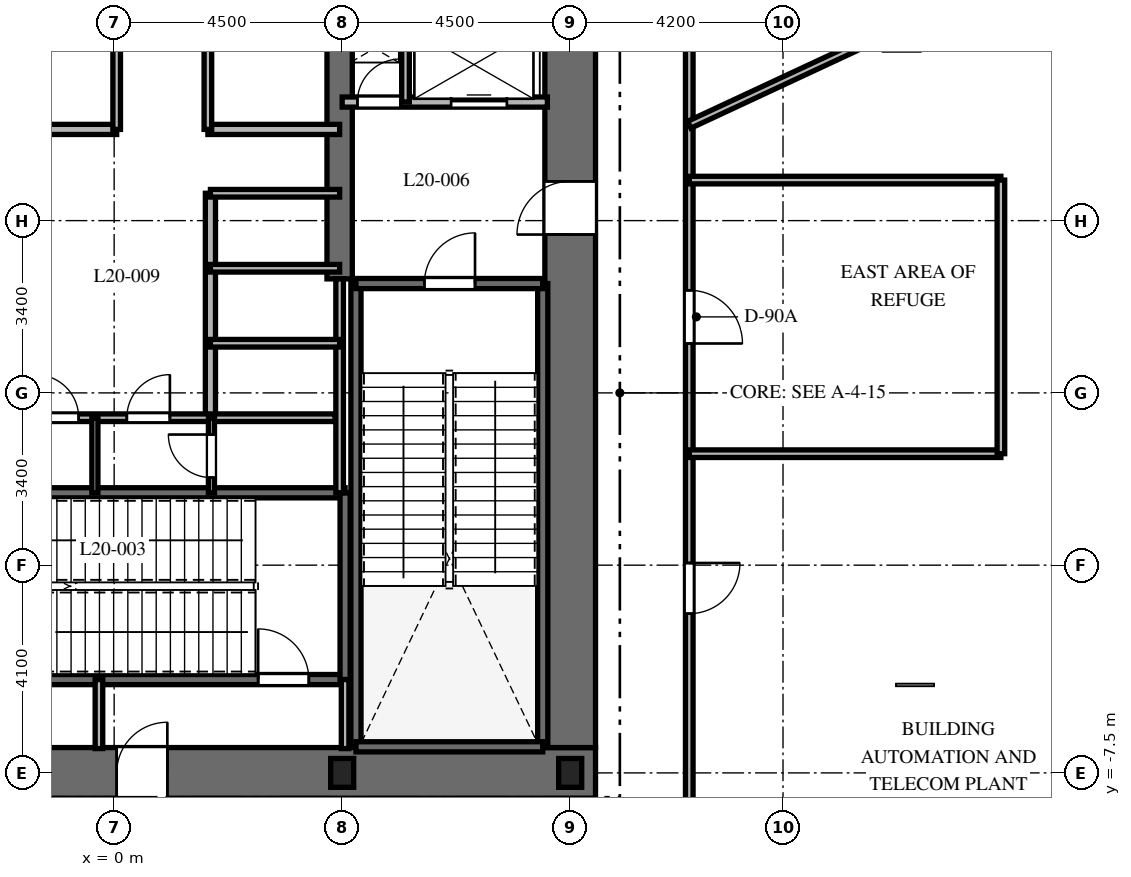
"""IFC4 building model, lengths in metres.
Left out: names, types, materials, properties, quantities, classifications, styles, units other than length and angle.
Written with IfcOpenShell. Run it as: python <this file> out.ifc"""

import sys

from ifc_helpers import new_model, si_unit, direction, frame, frame_2d, origin, origin_2d, place, context, subcontext, project, spatial, rectangle, i_section, extrude, element, fill, save


model = new_model("IFC4")
c1 = context("Model", 3, precision=1e-05, world=origin(), true_north=direction((0.0, 1.0)))
c2 = subcontext(c1, "Body", "Model", "MODEL_VIEW")
j1 = project(units=[si_unit("LENGTHUNIT", "METRE"), si_unit("PLANEANGLEUNIT", "RADIAN")], contexts=[c1])
p1 = place(None, origin())
s1 = spatial("IfcSite", under=j1, at=p1, CompositionType="ELEMENT")
p2 = place(p1, origin())
s2 = spatial("IfcBuilding", under=s1, at=p2, CompositionType="ELEMENT")
p3 = place(p2, frame((0.0, 0.0, 86.0)))
s3 = spatial("IfcBuildingStorey", under=s2, at=p3, CompositionType="ELEMENT", Elevation=86.0)
p4 = place(p3, frame((-9.5, -7.5, 0.0), z_axis=(0.0, 0.0, 1.0), x_axis=(1.0, 0.0, 0.0)))
e1 = element("IfcWall", 1, at=p4, inside=s3, PredefinedType="SHEAR", context=c2, shape_type="SweptSolid", body=[
    extrude(rectangle(XDim=19.0, YDim=1.0, at=frame_2d((9.5, 0.0))), origin(), (0.0, 0.0, 1.0), 5.4),
])
p5 = place(p4, frame((9.55, 0.0, 0.0)))
e2 = element("IfcOpeningElement", 2, at=p5, cuts=e1, PredefinedType="OPENING", context=c2, shape_type="SweptSolid", body=[
    extrude(rectangle(XDim=1.0, YDim=2.15, at=frame_2d((0.5, 1.075))), frame((0.0, 0.51, 0.0), z_axis=(0.0, -1.0, 0.0), x_axis=(1.0, 0.0, 0.0)), (0.0, 0.0, 1.0), 1.02),
])
p6 = place(p3, frame((9.0, -7.0, 0.0), z_axis=(0.0, 0.0, 1.0), x_axis=(0.0, 1.0, 0.0)))
e3 = element("IfcWall", 3, at=p6, inside=s3, PredefinedType="SHEAR", context=c2, shape_type="SweptSolid", body=[
    extrude(rectangle(XDim=14.0, YDim=1.0, at=frame_2d((7.0, 0.0))), origin(), (0.0, 0.0, 1.0), 5.4),
])
p7 = place(p6, frame((10.125, 0.0, 0.0)))
e4 = element("IfcOpeningElement", 4, at=p7, cuts=e3, PredefinedType="OPENING", context=c2, shape_type="SweptSolid", body=[
    extrude(rectangle(XDim=1.05, YDim=2.15, at=frame_2d((0.525, 1.075))), frame((0.0, 0.51, 0.0), z_axis=(0.0, -1.0, 0.0), x_axis=(1.0, 0.0, 0.0)), (0.0, 0.0, 1.0), 1.02),
])
p8 = place(p3, frame((4.45, 2.25, 0.0), z_axis=(0.0, 0.0, 1.0), x_axis=(0.0, 1.0, 0.0)))
e5 = element("IfcWall", 5, at=p8, inside=s3, PredefinedType="SHEAR", context=c2, shape_type="SweptSolid", body=[
    extrude(rectangle(XDim=4.75, YDim=0.5, at=frame_2d((2.375, 0.0))), origin(), (0.0, 0.0, 1.0), 5.4),
])
for number, where, z_axis, x_axis in (
    (6, (4.772, -6.985, 0.0), (0.0, 0.0, 1.0), (0.0, 1.0, 0.0)),
    (7, (8.458, -6.985, 0.0), (0.0, 0.0, 1.0), (0.0, 1.0, 0.0)),
):
    element("IfcWall", number, at=place(p3, frame(where, z_axis=z_axis, x_axis=x_axis)), inside=s3, PredefinedType="SHEAR", context=c2, shape_type="SweptSolid", body=[
        extrude(rectangle(XDim=9.143, YDim=0.2, at=frame_2d((4.572, 0.0))), origin(), (0.0, 0.0, 1.0), 5.4),
    ])
p9 = place(p3, frame((4.772, -6.985, 0.0), z_axis=(0.0, 0.0, 1.0), x_axis=(1.0, 0.0, 0.0)))
e8 = element("IfcWall", 8, at=p9, inside=s3, PredefinedType="SHEAR", context=c2, shape_type="SweptSolid", body=[
    extrude(rectangle(XDim=3.686, YDim=0.2, at=frame_2d((1.843, 0.0))), origin(), (0.0, 0.0, 1.0), 5.4),
])
p10 = place(p3, frame((4.772, 2.158, 0.0), z_axis=(0.0, 0.0, 1.0), x_axis=(1.0, 0.0, 0.0)))
e9 = element("IfcWall", 9, at=p10, inside=s3, PredefinedType="SHEAR", context=c2, shape_type="SweptSolid", body=[
    extrude(rectangle(XDim=3.686, YDim=0.2, at=frame_2d((1.843, 0.0))), origin(), (0.0, 0.0, 1.0), 5.4),
])
p11 = place(p10, frame((1.35, 0.0, 0.0)))
e10 = element("IfcOpeningElement", 10, at=p11, cuts=e9, PredefinedType="OPENING", context=c2, shape_type="SweptSolid", body=[
    extrude(rectangle(XDim=1.0, YDim=2.15, at=frame_2d((0.5, 1.075))), frame((0.0, 0.11, 0.0), z_axis=(0.0, -1.0, 0.0), x_axis=(1.0, 0.0, 0.0)), (0.0, 0.0, 1.0), 0.22),
])
p12 = place(p3, frame((-4.608, -5.658, 0.0), z_axis=(0.0, 0.0, 1.0), x_axis=(1.0, 0.0, 0.0)))
e11 = element("IfcWall", 11, at=p12, inside=s3, PredefinedType="SHEAR", context=c2, shape_type="SweptSolid", body=[
    extrude(rectangle(XDim=9.166, YDim=0.2, at=frame_2d((4.583, 0.0))), origin(), (0.0, 0.0, 1.0), 5.4),
])
p13 = place(p12, frame((7.45, 0.0, 0.0)))
e12 = element("IfcOpeningElement", 12, at=p13, cuts=e11, PredefinedType="OPENING", context=c2, shape_type="SweptSolid", body=[
    extrude(rectangle(XDim=1.0, YDim=2.15, at=frame_2d((0.5, 1.075))), frame((0.0, 0.11, 0.0), z_axis=(0.0, -1.0, 0.0), x_axis=(1.0, 0.0, 0.0)), (0.0, 0.0, 1.0), 0.22),
])
p14 = place(p3, frame((-4.608, -1.972, 0.0), z_axis=(0.0, 0.0, 1.0), x_axis=(1.0, 0.0, 0.0)))
e13 = element("IfcWall", 13, at=p14, inside=s3, PredefinedType="SHEAR", context=c2, shape_type="SweptSolid", body=[
    extrude(rectangle(XDim=9.166, YDim=0.2, at=frame_2d((4.583, 0.0))), origin(), (0.0, 0.0, 1.0), 5.4),
])
p15 = place(p3, frame((4.558, -5.658, 0.0), z_axis=(0.0, 0.0, 1.0), x_axis=(0.0, 1.0, 0.0)))
e14 = element("IfcWall", 14, at=p15, inside=s3, PredefinedType="SHEAR", context=c2, shape_type="SweptSolid", body=[
    extrude(rectangle(XDim=3.686, YDim=0.2, at=frame_2d((1.843, 0.0))), origin(), (0.0, 0.0, 1.0), 5.4),
])
for number, where, z_axis, x_axis in (
    (15, (4.5, -7.5, 0.0), (0.0, 0.0, 1.0), (1.0, 0.0, 0.0)),
    (16, (9.0, -7.5, 0.0), (0.0, 0.0, 1.0), (1.0, 0.0, 0.0)),
):
    element("IfcColumn", number, at=place(p3, frame(where, z_axis=z_axis, x_axis=x_axis)), inside=s3, PredefinedType="COLUMN", context=c2, shape_type="SweptSolid", body=[
        extrude(i_section(OverallWidth=0.454, OverallDepth=0.569, WebThickness=0.078, FlangeThickness=0.125, at=origin_2d()), origin(), (0.0, 0.0, 1.0), 5.4),
    ])
p16 = place(p3, frame((17.39, -20.678, 0.0), z_axis=(0.0, 0.0, 1.0), x_axis=(0.326068018294, 0.945346310854, 0.0)))
e17 = element("IfcWall", 17, at=p16, inside=s3, PredefinedType="SOLIDWALL", context=c2, shape_type="SweptSolid", body=[
    extrude(rectangle(XDim=21.793, YDim=0.45, at=frame_2d((10.896, 0.0))), origin(), (0.0, 0.0, 1.0), 5.1),
])
p17 = place(p3, frame((24.336, 2.532, 0.0), z_axis=(0.0, 0.0, 1.0), x_axis=(-0.438931326393, 0.898520612291, 0.0)))
e18 = element("IfcWall", 18, at=p17, inside=s3, PredefinedType="SOLIDWALL", context=c2, shape_type="SweptSolid", body=[
    extrude(rectangle(XDim=20.623, YDim=0.45, at=frame_2d((10.312, 0.0))), origin(), (0.0, 0.0, 1.0), 5.1),
])
for number, where, z_axis, x_axis in (
    (19, (-0.3, -7.02, 0.0), (0.0, 0.0, 1.0), (0.0, 1.0, 0.0)),
    (20, (4.558, -7.02, 0.0), (0.0, 0.0, 1.0), (0.0, 1.0, 0.0)),
):
    element("IfcWall", number, at=place(p3, frame(where, z_axis=z_axis, x_axis=x_axis)), inside=s3, PredefinedType="PARTITIONING", context=c2, shape_type="SweptSolid", body=[
        extrude(rectangle(XDim=1.362, YDim=0.15, at=frame_2d((0.681, 0.0))), origin(), (0.0, 0.0, 1.0), 5.1),
    ])
p18 = place(p3, frame((4.5, 5.74, 0.0), z_axis=(0.0, 0.0, 1.0), x_axis=(1.0, 0.0, 0.0)))
e21 = element("IfcWall", 21, at=p18, inside=s3, PredefinedType="PARTITIONING", context=c2, shape_type="SweptSolid", body=[
    extrude(rectangle(XDim=4.05, YDim=0.2, at=frame_2d((2.025, 0.0))), origin(), (0.0, 0.0, 1.0), 5.1),
])
p19 = place(p18, frame((0.3, 0.0, 0.0)))
e22 = element("IfcOpeningElement", 22, at=p19, cuts=e21, PredefinedType="OPENING", context=c2, shape_type="SweptSolid", body=[
    extrude(rectangle(XDim=0.85, YDim=2.03, at=frame_2d((0.425, 1.015))), frame((0.0, 0.11, 0.0), z_axis=(0.0, -1.0, 0.0), x_axis=(1.0, 0.0, 0.0)), (0.0, 0.0, 1.0), 0.22),
])
p20 = place(p18, frame((2.15, 0.0, 0.0)))
e23 = element("IfcOpeningElement", 23, at=p20, cuts=e21, PredefinedType="OPENING", context=c2, shape_type="SweptSolid", body=[
    extrude(rectangle(XDim=1.1, YDim=2.2, at=frame_2d((0.55, 1.1))), frame((0.0, 0.11, 0.0), z_axis=(0.0, -1.0, 0.0), x_axis=(1.0, 0.0, 0.0)), (0.0, 0.0, 1.0), 0.22),
])
p21 = place(p3, frame((5.75, 5.74, 0.0), z_axis=(0.0, 0.0, 1.0), x_axis=(0.0, 1.0, 0.0)))
e24 = element("IfcWall", 24, at=p21, inside=s3, PredefinedType="PARTITIONING", context=c2, shape_type="SweptSolid", body=[
    extrude(rectangle(XDim=1.41, YDim=0.15, at=frame_2d((0.705, 0.0))), origin(), (0.0, 0.0, 1.0), 5.1),
])
p22 = place(p3, frame((-4.45, 5.2, 0.0), z_axis=(0.0, 0.0, 1.0), x_axis=(1.0, 0.0, 0.0)))
e25 = element("IfcWall", 25, at=p22, inside=s3, PredefinedType="PARTITIONING", context=c2, shape_type="SweptSolid", body=[
    extrude(rectangle(XDim=4.5, YDim=0.2, at=frame_2d((2.25, 0.0))), origin(), (0.0, 0.0, 1.0), 5.1),
])
p23 = place(p3, frame((1.85, 5.2, 0.0), z_axis=(0.0, 0.0, 1.0), x_axis=(1.0, 0.0, 0.0)))
e26 = element("IfcWall", 26, at=p23, inside=s3, PredefinedType="PARTITIONING", context=c2, shape_type="SweptSolid", body=[
    extrude(rectangle(XDim=2.6, YDim=0.2, at=frame_2d((1.3, 0.0))), origin(), (0.0, 0.0, 1.0), 5.1),
])
for number, where, z_axis, x_axis in (
    (27, (0.05, 5.2, 0.0), (0.0, 0.0, 1.0), (0.0, 1.0, 0.0)),
    (28, (1.85, 5.2, 0.0), (0.0, 0.0, 1.0), (0.0, 1.0, 0.0)),
):
    element("IfcWall", number, at=place(p3, frame(where, z_axis=z_axis, x_axis=x_axis)), inside=s3, PredefinedType="PARTITIONING", context=c2, shape_type="SweptSolid", body=[
        extrude(rectangle(XDim=1.95, YDim=0.15, at=frame_2d((0.975, 0.0))), origin(), (0.0, 0.0, 1.0), 5.1),
    ])
p24 = place(p3, frame((4.45, -1.972, 0.0), z_axis=(0.0, 0.0, 1.0), x_axis=(0.0, 1.0, 0.0)))
e29 = element("IfcWall", 29, at=p24, inside=s3, PredefinedType="PARTITIONING", context=c2, shape_type="SweptSolid", body=[
    extrude(rectangle(XDim=4.222, YDim=0.15, at=frame_2d((2.111, 0.0))), origin(), (0.0, 0.0, 1.0), 5.1),
])
p25 = place(p3, frame((1.9, -0.5, 0.0), z_axis=(0.0, 0.0, 1.0), x_axis=(0.0, 1.0, 0.0)))
e30 = element("IfcWall", 30, at=p25, inside=s3, PredefinedType="PARTITIONING", context=c2, shape_type="SweptSolid", body=[
    extrude(rectangle(XDim=4.44, YDim=0.2, at=frame_2d((2.22, 0.0))), origin(), (0.0, 0.0, 1.0), 5.1),
])
for number, where, z_axis, x_axis in (
    (31, (1.9, 3.94, 0.0), (0.0, 0.0, 1.0), (1.0, 0.0, 0.0)),
    (32, (1.9, 0.98, 0.0), (0.0, 0.0, 1.0), (1.0, 0.0, 0.0)),
    (33, (1.9, 2.46, 0.0), (0.0, 0.0, 1.0), (1.0, 0.0, 0.0)),
):
    element("IfcWall", number, at=place(p3, frame(where, z_axis=z_axis, x_axis=x_axis)), inside=s3, PredefinedType="PARTITIONING", context=c2, shape_type="SweptSolid", body=[
        extrude(rectangle(XDim=2.55, YDim=0.15, at=frame_2d((1.275, 0.0))), origin(), (0.0, 0.0, 1.0), 5.1),
    ])
p26 = place(p3, frame((-4.36, -0.49, 0.0), z_axis=(0.0, 0.0, 1.0), x_axis=(1.0, 0.0, 0.0)))
e34 = element("IfcWall", 34, at=p26, inside=s3, PredefinedType="PARTITIONING", context=c2, shape_type="SweptSolid", body=[
    extrude(rectangle(XDim=8.72, YDim=0.15, at=frame_2d((4.36, 0.0))), origin(), (0.0, 0.0, 1.0), 5.1),
])
p27 = place(p26, frame((2.81, 0.0, 0.0)))
e35 = element("IfcOpeningElement", 35, at=p27, cuts=e34, PredefinedType="OPENING", context=c2, shape_type="SweptSolid", body=[
    extrude(rectangle(XDim=0.85, YDim=2.03, at=frame_2d((0.425, 1.015))), frame((0.0, 0.085, 0.0), z_axis=(0.0, -1.0, 0.0), x_axis=(1.0, 0.0, 0.0)), (0.0, 0.0, 1.0), 0.17),
])
p28 = place(p26, frame((4.61, 0.0, 0.0)))
e36 = element("IfcOpeningElement", 36, at=p28, cuts=e34, PredefinedType="OPENING", context=c2, shape_type="SweptSolid", body=[
    extrude(rectangle(XDim=0.85, YDim=2.03, at=frame_2d((0.425, 1.015))), frame((0.0, 0.085, 0.0), z_axis=(0.0, -1.0, 0.0), x_axis=(1.0, 0.0, 0.0)), (0.0, 0.0, 1.0), 0.17),
])
p29 = place(p3, frame((-0.38, -1.972, 0.0), z_axis=(0.0, 0.0, 1.0), x_axis=(0.0, 1.0, 0.0)))
e37 = element("IfcWall", 37, at=p29, inside=s3, PredefinedType="PARTITIONING", context=c2, shape_type="SweptSolid", body=[
    extrude(rectangle(XDim=1.472, YDim=0.12, at=frame_2d((0.736, 0.0))), origin(), (0.0, 0.0, 1.0), 5.1),
])
p30 = place(p3, frame((1.92, -1.972, 0.0), z_axis=(0.0, 0.0, 1.0), x_axis=(0.0, 1.0, 0.0)))
e38 = element("IfcWall", 38, at=p30, inside=s3, PredefinedType="PARTITIONING", context=c2, shape_type="SweptSolid", body=[
    extrude(rectangle(XDim=1.472, YDim=0.12, at=frame_2d((0.736, 0.0))), origin(), (0.0, 0.0, 1.0), 5.1),
])
p31 = place(p30, frame((0.3, 0.0, 0.0)))
e39 = element("IfcOpeningElement", 39, at=p31, cuts=e38, PredefinedType="OPENING", context=c2, shape_type="SweptSolid", body=[
    extrude(rectangle(XDim=0.85, YDim=2.03, at=frame_2d((0.425, 1.015))), frame((0.0, 0.07, 0.0), z_axis=(0.0, -1.0, 0.0), x_axis=(1.0, 0.0, 0.0)), (0.0, 0.0, 1.0), 0.14),
])
p32 = place(p3, frame((11.35, 9.85, 0.0), z_axis=(0.0, 0.0, 1.0), x_axis=(0.0, -1.0, 0.0)))
e40 = element("IfcWall", 40, at=p32, inside=s3, PredefinedType="PARTITIONING", context=c2, shape_type="SweptSolid", body=[
    extrude(rectangle(XDim=19.7, YDim=0.15, at=frame_2d((9.85, 0.0))), origin(), (0.0, 0.0, 1.0), 3.29),
])
p33 = place(p32, frame((7.825, 0.0, 0.0)))
e41 = element("IfcOpeningElement", 41, at=p33, cuts=e40, PredefinedType="OPENING", context=c2, shape_type="SweptSolid", body=[
    extrude(rectangle(XDim=1.05, YDim=2.15, at=frame_2d((0.525, 1.075))), frame((0.0, 0.085, 0.0), z_axis=(0.0, -1.0, 0.0), x_axis=(1.0, 0.0, 0.0)), (0.0, 0.0, 1.0), 0.17),
])
p34 = place(p32, frame((13.207, 0.0, 0.0)))
e42 = element("IfcOpeningElement", 42, at=p34, cuts=e40, PredefinedType="OPENING", context=c2, shape_type="SweptSolid", body=[
    extrude(rectangle(XDim=1.0, YDim=2.15, at=frame_2d((0.5, 1.075))), frame((0.0, 0.085, 0.0), z_axis=(0.0, -1.0, 0.0), x_axis=(1.0, 0.0, 0.0)), (0.0, 0.0, 1.0), 0.17),
])
for number, where, z_axis, x_axis in (
    (43, (11.35, -1.2, 0.0), (0.0, 0.0, 1.0), (1.0, 0.0, 0.0)),
    (44, (11.35, 4.2, 0.0), (0.0, 0.0, 1.0), (1.0, 0.0, 0.0)),
):
    element("IfcWall", number, at=place(p3, frame(where, z_axis=z_axis, x_axis=x_axis)), inside=s3, PredefinedType="PARTITIONING", context=c2, shape_type="SweptSolid", body=[
        extrude(rectangle(XDim=6.15, YDim=0.15, at=frame_2d((3.075, 0.0))), origin(), (0.0, 0.0, 1.0), 4.626),
    ])
p35 = place(p3, frame((17.5, -1.2, 0.0), z_axis=(0.0, 0.0, 1.0), x_axis=(0.0, 1.0, 0.0)))
e45 = element("IfcWall", 45, at=p35, inside=s3, PredefinedType="PARTITIONING", context=c2, shape_type="SweptSolid", body=[
    extrude(rectangle(XDim=5.4, YDim=0.15, at=frame_2d((2.7, 0.0))), origin(), (0.0, 0.0, 1.0), 5.1),
])
p36 = place(p3, frame((11.35, 5.292, 0.0), z_axis=(0.0, 0.0, 1.0), x_axis=(0.906302978375, 0.422628573796, 0.0)))
e46 = element("IfcWall", 46, at=p36, inside=s3, PredefinedType="PARTITIONING", context=c2, shape_type="SweptSolid", body=[
    extrude(rectangle(XDim=10.458, YDim=0.15, at=frame_2d((5.229, 0.0))), origin(), (0.0, 0.0, 1.0), 3.29),
])
p37 = place(p11, origin())
e47 = element("IfcDoor", 47, at=p37, inside=s3, OperationType="SINGLE_SWING_RIGHT", PredefinedType="DOOR", context=c2, shape_type="SweptSolid", body=[
    extrude(rectangle(XDim=1.0, YDim=2.15, at=frame_2d((0.5, 1.075))), frame((0.0, 0.025, 0.0), z_axis=(0.0, -1.0, 0.0), x_axis=(1.0, 0.0, 0.0)), (0.0, 0.0, 1.0), 0.05),
])
fill(e10, e47)
p38 = place(p13, origin())
e48 = element("IfcDoor", 48, at=p38, inside=s3, OperationType="SINGLE_SWING_LEFT", PredefinedType="DOOR", context=c2, shape_type="SweptSolid", body=[
    extrude(rectangle(XDim=1.0, YDim=2.15, at=frame_2d((0.5, 1.075))), frame((0.0, 0.025, 0.0), z_axis=(0.0, -1.0, 0.0), x_axis=(1.0, 0.0, 0.0)), (0.0, 0.0, 1.0), 0.05),
])
fill(e12, e48)
p39 = place(p5, origin())
e49 = element("IfcDoor", 49, at=p39, inside=s3, OperationType="SINGLE_SWING_RIGHT", PredefinedType="DOOR", context=c2, shape_type="SweptSolid", body=[
    extrude(rectangle(XDim=1.0, YDim=2.15, at=frame_2d((0.5, 1.075))), frame((0.0, 0.025, 0.0), z_axis=(0.0, -1.0, 0.0), x_axis=(1.0, 0.0, 0.0)), (0.0, 0.0, 1.0), 0.05),
])
fill(e2, e49)
p40 = place(p7, origin())
e50 = element("IfcDoor", 50, at=p40, inside=s3, OperationType="SINGLE_SWING_LEFT", PredefinedType="DOOR", context=c2, shape_type="SweptSolid", body=[
    extrude(rectangle(XDim=1.05, YDim=2.15, at=frame_2d((0.525, 1.075))), frame((0.0, 0.025, 0.0), z_axis=(0.0, -1.0, 0.0), x_axis=(1.0, 0.0, 0.0)), (0.0, 0.0, 1.0), 0.05),
])
fill(e4, e50)
p41 = place(p19, origin())
e51 = element("IfcDoor", 51, at=p41, inside=s3, OperationType="SINGLE_SWING_RIGHT", PredefinedType="DOOR", context=c2, shape_type="SweptSolid", body=[
    extrude(rectangle(XDim=0.85, YDim=2.03, at=frame_2d((0.425, 1.015))), frame((0.0, 0.025, 0.0), z_axis=(0.0, -1.0, 0.0), x_axis=(1.0, 0.0, 0.0)), (0.0, 0.0, 1.0), 0.05),
])
fill(e22, e51)
p42 = place(p20, origin())
e52 = element("IfcDoor", 52, at=p42, inside=s3, OperationType="SLIDING_TO_RIGHT", PredefinedType="DOOR", context=c2, shape_type="SweptSolid", body=[
    extrude(rectangle(XDim=1.1, YDim=2.2, at=frame_2d((0.55, 1.1))), frame((0.0, 0.025, 0.0), z_axis=(0.0, -1.0, 0.0), x_axis=(1.0, 0.0, 0.0)), (0.0, 0.0, 1.0), 0.05),
])
fill(e23, e52)
p43 = place(p27, origin())
e53 = element("IfcDoor", 53, at=p43, inside=s3, OperationType="SINGLE_SWING_LEFT", PredefinedType="DOOR", context=c2, shape_type="SweptSolid", body=[
    extrude(rectangle(XDim=0.85, YDim=2.03, at=frame_2d((0.425, 1.015))), frame((0.0, 0.025, 0.0), z_axis=(0.0, -1.0, 0.0), x_axis=(1.0, 0.0, 0.0)), (0.0, 0.0, 1.0), 0.05),
])
fill(e35, e53)
p44 = place(p28, origin())
e54 = element("IfcDoor", 54, at=p44, inside=s3, OperationType="SINGLE_SWING_RIGHT", PredefinedType="DOOR", context=c2, shape_type="SweptSolid", body=[
    extrude(rectangle(XDim=0.85, YDim=2.03, at=frame_2d((0.425, 1.015))), frame((0.0, 0.025, 0.0), z_axis=(0.0, -1.0, 0.0), x_axis=(1.0, 0.0, 0.0)), (0.0, 0.0, 1.0), 0.05),
])
fill(e36, e54)
p45 = place(p31, origin())
e55 = element("IfcDoor", 55, at=p45, inside=s3, OperationType="SINGLE_SWING_RIGHT", PredefinedType="DOOR", context=c2, shape_type="SweptSolid", body=[
    extrude(rectangle(XDim=0.85, YDim=2.03, at=frame_2d((0.425, 1.015))), frame((0.0, 0.025, 0.0), z_axis=(0.0, -1.0, 0.0), x_axis=(1.0, 0.0, 0.0)), (0.0, 0.0, 1.0), 0.05),
])
fill(e39, e55)
p46 = place(p33, origin())
e56 = element("IfcDoor", 56, at=p46, inside=s3, OperationType="SINGLE_SWING_RIGHT", PredefinedType="DOOR", context=c2, shape_type="SweptSolid", body=[
    extrude(rectangle(XDim=1.05, YDim=2.15, at=frame_2d((0.525, 1.075))), frame((0.0, 0.025, 0.0), z_axis=(0.0, -1.0, 0.0), x_axis=(1.0, 0.0, 0.0)), (0.0, 0.0, 1.0), 0.05),
])
fill(e41, e56)
p47 = place(p34, origin())
e57 = element("IfcDoor", 57, at=p47, inside=s3, OperationType="SINGLE_SWING_LEFT", PredefinedType="DOOR", context=c2, shape_type="SweptSolid", body=[
    extrude(rectangle(XDim=1.0, YDim=2.15, at=frame_2d((0.5, 1.075))), frame((0.0, 0.025, 0.0), z_axis=(0.0, -1.0, 0.0), x_axis=(1.0, 0.0, 0.0)), (0.0, 0.0, 1.0), 0.05),
])
fill(e42, e57)
save(model, sys.argv[1])
